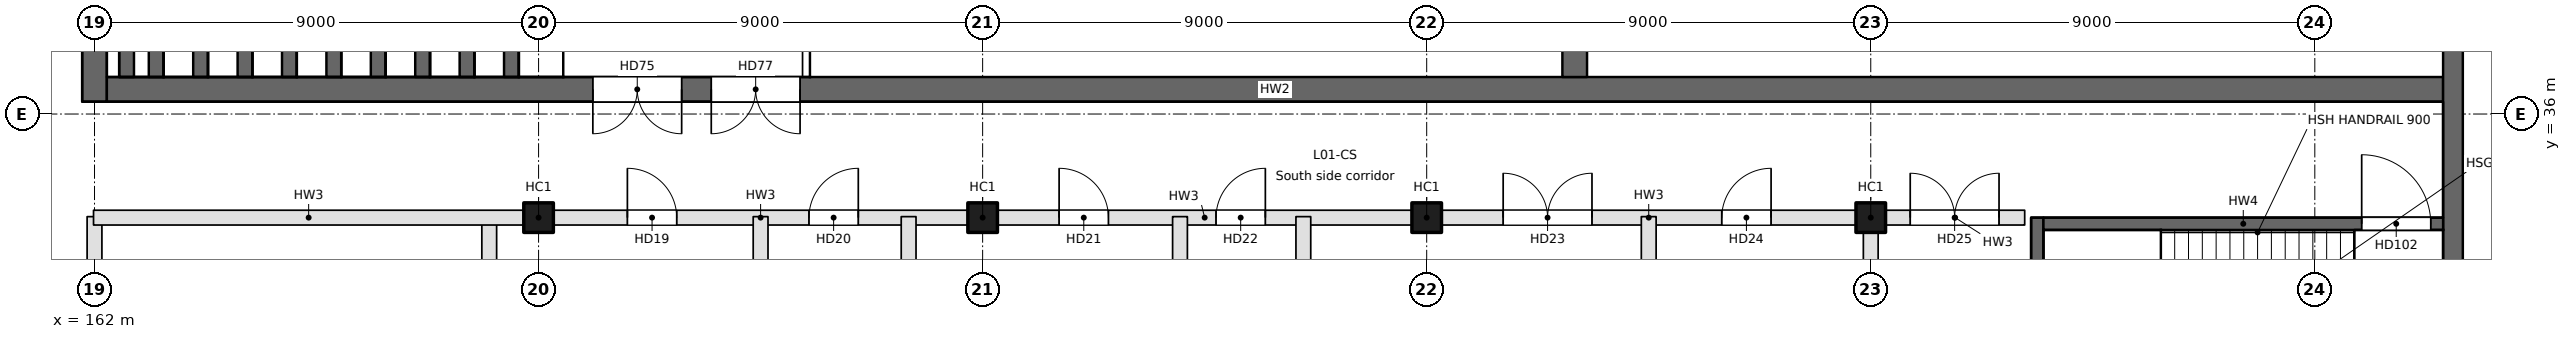
"""IFC4 building model, lengths in metres.
Left out: names, types, materials, properties, quantities, classifications, styles, units other than length and angle.
Written with IfcOpenShell. Run it as: python <this file> out.ifc"""

import sys

from ifc_helpers import new_model, si_unit, direction, frame, frame_2d, origin, origin_2d, place, context, subcontext, project, spatial, rectangle, extrude, element, fill, save


model = new_model("IFC4")
c1 = context("Model", 3, precision=1e-05, world=origin(), true_north=direction((0.0, 1.0)))
c2 = subcontext(c1, "Body", "Model", "MODEL_VIEW")
j1 = project(units=[si_unit("LENGTHUNIT", "METRE"), si_unit("PLANEANGLEUNIT", "RADIAN")], contexts=[c1])
p1 = place(None, origin())
s1 = spatial("IfcSite", under=j1, at=p1, CompositionType="ELEMENT")
p2 = place(p1, origin())
s2 = spatial("IfcBuilding", under=s1, at=p2, CompositionType="ELEMENT")
p3 = place(p2, frame((0.0, 0.0, 6.0)))
s3 = spatial("IfcBuildingStorey", under=s2, at=p3, CompositionType="ELEMENT", Elevation=6.0)
for number, where, z_axis, x_axis in (
    (1, (171.0, 33.9, 0.0), (0.0, 0.0, 1.0), (1.0, 0.0, 0.0)),
    (2, (180.0, 33.9, 0.0), (0.0, 0.0, 1.0), (1.0, 0.0, 0.0)),
    (3, (189.0, 33.9, 0.0), (0.0, 0.0, 1.0), (1.0, 0.0, 0.0)),
    (4, (198.0, 33.9, 0.0), (0.0, 0.0, 1.0), (1.0, 0.0, 0.0)),
):
    element("IfcColumn", number, at=place(p3, frame(where, z_axis=z_axis, x_axis=x_axis)), inside=s3, PredefinedType="COLUMN", context=c2, shape_type="SweptSolid", body=[
        extrude(rectangle(XDim=0.6, YDim=0.6, at=origin_2d()), origin(), (0.0, 0.0, 1.0), 5.4),
    ])
p4 = place(p3, frame((162.0, 36.25, -0.35), z_axis=(0.0, 0.0, 1.0), x_axis=(0.0, 1.0, 0.0)))
e5 = element("IfcWall", 5, at=p4, inside=s3, PredefinedType="SOLIDWALL", context=c2, shape_type="SweptSolid", body=[
    extrude(rectangle(XDim=26.5, YDim=0.5, at=frame_2d((13.25, 0.0))), origin(), (0.0, 0.0, 1.0), 5.4),
])
p5 = place(p3, frame((209.6, 36.5, -0.35), z_axis=(0.0, 0.0, 1.0), x_axis=(-1.0, 0.0, 0.0)))
e6 = element("IfcWall", 6, at=p5, inside=s3, PredefinedType="SOLIDWALL", context=c2, shape_type="SweptSolid", body=[
    extrude(rectangle(XDim=47.35, YDim=0.5, at=frame_2d((23.675, 0.0))), origin(), (0.0, 0.0, 1.0), 5.4),
])
p6 = place(p5, frame((35.7, 0.0, 0.35)))
e7 = element("IfcOpeningElement", 7, at=p6, cuts=e6, PredefinedType="OPENING", context=c2, shape_type="SweptSolid", body=[
    extrude(rectangle(XDim=1.8, YDim=2.4, at=frame_2d((0.9, 1.2))), frame((0.0, 0.25, 0.0), z_axis=(0.0, -1.0, 0.0), x_axis=(1.0, 0.0, 0.0)), (0.0, 0.0, 1.0), 0.5),
])
p7 = place(p5, frame((33.3, 0.0, 0.35)))
e8 = element("IfcOpeningElement", 8, at=p7, cuts=e6, PredefinedType="OPENING", context=c2, shape_type="SweptSolid", body=[
    extrude(rectangle(XDim=1.8, YDim=2.4, at=frame_2d((0.9, 1.2))), frame((0.0, 0.25, 0.0), z_axis=(0.0, -1.0, 0.0), x_axis=(1.0, 0.0, 0.0)), (0.0, 0.0, 1.0), 0.5),
])
p8 = place(p3, frame((192.0, 36.75, -0.35), z_axis=(0.0, 0.0, 1.0), x_axis=(0.0, 1.0, 0.0)))
e9 = element("IfcWall", 9, at=p8, inside=s3, PredefinedType="SOLIDWALL", context=c2, shape_type="SweptSolid", body=[
    extrude(rectangle(XDim=5.75, YDim=0.5, at=frame_2d((2.875, 0.0))), origin(), (0.0, 0.0, 1.0), 5.4),
])
p9 = place(p3, frame((209.8, 76.5, -0.35), z_axis=(0.0, 0.0, 1.0), x_axis=(0.0, -1.0, 0.0)))
e10 = element("IfcWall", 10, at=p9, inside=s3, PredefinedType="SOLIDWALL", context=c2, shape_type="SweptSolid", body=[
    extrude(rectangle(XDim=54.0, YDim=0.4, at=frame_2d((27.0, 0.0))), origin(), (0.0, 0.0, 1.0), 5.4),
])
p10 = place(p9, frame((49.3, 0.0, 1.25)))
e11 = element("IfcOpeningElement", 11, at=p10, cuts=e10, PredefinedType="OPENING", context=c2, shape_type="SweptSolid", body=[
    extrude(rectangle(XDim=2.4, YDim=1.8, at=frame_2d((1.2, 0.9))), frame((0.0, 0.2, 0.0), z_axis=(0.0, -1.0, 0.0), x_axis=(1.0, 0.0, 0.0)), (0.0, 0.0, 1.0), 0.4),
])
p11 = place(p9, frame((2.3, 0.0, 1.25)))
e12 = element("IfcOpeningElement", 12, at=p11, cuts=e10, PredefinedType="OPENING", context=c2, shape_type="SweptSolid", body=[
    extrude(rectangle(XDim=2.4, YDim=1.8, at=frame_2d((1.2, 0.9))), frame((0.0, 0.2, 0.0), z_axis=(0.0, -1.0, 0.0), x_axis=(1.0, 0.0, 0.0)), (0.0, 0.0, 1.0), 0.4),
])
p12 = place(p3, frame((170.45, 36.75, 0.0), z_axis=(0.0, 0.0, 1.0), x_axis=(0.0, 1.0, 0.0)))
e13 = element("IfcWall", 13, at=p12, inside=s3, PredefinedType="SOLIDWALL", context=c2, shape_type="SweptSolid", body=[
    extrude(rectangle(XDim=25.5, YDim=0.3, at=frame_2d((12.75, 0.0))), origin(), (0.0, 0.0, 1.0), 0.2),
])
p13 = place(p3, frame((169.55, 36.75, 0.0), z_axis=(0.0, 0.0, 1.0), x_axis=(0.0, 1.0, 0.0)))
e14 = element("IfcWall", 14, at=p13, inside=s3, PredefinedType="SOLIDWALL", context=c2, shape_type="SweptSolid", body=[
    extrude(rectangle(XDim=25.5, YDim=0.3, at=frame_2d((12.75, 0.0))), origin(), (0.0, 0.0, 1.0), 0.4),
])
p14 = place(p3, frame((168.65, 36.75, 0.0), z_axis=(0.0, 0.0, 1.0), x_axis=(0.0, 1.0, 0.0)))
e15 = element("IfcWall", 15, at=p14, inside=s3, PredefinedType="SOLIDWALL", context=c2, shape_type="SweptSolid", body=[
    extrude(rectangle(XDim=25.5, YDim=0.3, at=frame_2d((12.75, 0.0))), origin(), (0.0, 0.0, 1.0), 0.6),
])
p15 = place(p3, frame((167.75, 36.75, 0.0), z_axis=(0.0, 0.0, 1.0), x_axis=(0.0, 1.0, 0.0)))
e16 = element("IfcWall", 16, at=p15, inside=s3, PredefinedType="SOLIDWALL", context=c2, shape_type="SweptSolid", body=[
    extrude(rectangle(XDim=25.5, YDim=0.3, at=frame_2d((12.75, 0.0))), origin(), (0.0, 0.0, 1.0), 0.8),
])
p16 = place(p3, frame((166.85, 36.75, 0.0), z_axis=(0.0, 0.0, 1.0), x_axis=(0.0, 1.0, 0.0)))
e17 = element("IfcWall", 17, at=p16, inside=s3, PredefinedType="SOLIDWALL", context=c2, shape_type="SweptSolid", body=[
    extrude(rectangle(XDim=25.5, YDim=0.3, at=frame_2d((12.75, 0.0))), origin(), (0.0, 0.0, 1.0), 1.0),
])
p17 = place(p3, frame((165.95, 36.75, 0.0), z_axis=(0.0, 0.0, 1.0), x_axis=(0.0, 1.0, 0.0)))
e18 = element("IfcWall", 18, at=p17, inside=s3, PredefinedType="SOLIDWALL", context=c2, shape_type="SweptSolid", body=[
    extrude(rectangle(XDim=25.5, YDim=0.3, at=frame_2d((12.75, 0.0))), origin(), (0.0, 0.0, 1.0), 1.2),
])
p18 = place(p3, frame((165.05, 36.75, 0.0), z_axis=(0.0, 0.0, 1.0), x_axis=(0.0, 1.0, 0.0)))
e19 = element("IfcWall", 19, at=p18, inside=s3, PredefinedType="SOLIDWALL", context=c2, shape_type="SweptSolid", body=[
    extrude(rectangle(XDim=25.5, YDim=0.3, at=frame_2d((12.75, 0.0))), origin(), (0.0, 0.0, 1.0), 1.4),
])
p19 = place(p3, frame((164.15, 36.75, 0.0), z_axis=(0.0, 0.0, 1.0), x_axis=(0.0, 1.0, 0.0)))
e20 = element("IfcWall", 20, at=p19, inside=s3, PredefinedType="SOLIDWALL", context=c2, shape_type="SweptSolid", body=[
    extrude(rectangle(XDim=25.5, YDim=0.3, at=frame_2d((12.75, 0.0))), origin(), (0.0, 0.0, 1.0), 1.6),
])
for number, where, z_axis, x_axis in (
    (21, (163.25, 36.75, 0.0), (0.0, 0.0, 1.0), (0.0, 1.0, 0.0)),
    (22, (162.65, 36.75, 0.0), (0.0, 0.0, 1.0), (0.0, 1.0, 0.0)),
):
    element("IfcWall", number, at=place(p3, frame(where, z_axis=z_axis, x_axis=x_axis)), inside=s3, PredefinedType="SOLIDWALL", context=c2, shape_type="SweptSolid", body=[
        extrude(rectangle(XDim=25.5, YDim=0.3, at=frame_2d((12.75, 0.0))), origin(), (0.0, 0.0, 1.0), 1.8),
    ])
p20 = place(p3, frame((162.0, 22.73, 0.0), z_axis=(0.0, 0.0, 1.0), x_axis=(0.0, 1.0, 0.0)))
e23 = element("IfcWall", 23, at=p20, inside=s3, PredefinedType="PARTITIONING", context=c2, shape_type="SweptSolid", body=[
    extrude(rectangle(XDim=11.19, YDim=0.3, at=frame_2d((5.595, 0.0))), origin(), (0.0, 0.0, 1.0), 5.05),
])
p21 = place(p20, frame((4.75, 0.0, 0.0)))
e24 = element("IfcOpeningElement", 24, at=p21, cuts=e23, PredefinedType="OPENING", context=c2, shape_type="SweptSolid", body=[
    extrude(rectangle(XDim=1.8, YDim=2.1, at=frame_2d((0.9, 1.05))), frame((0.0, 0.15, 0.0), z_axis=(0.0, -1.0, 0.0), x_axis=(1.0, 0.0, 0.0)), (0.0, 0.0, 1.0), 0.3),
])
p22 = place(p3, frame((170.0, 22.73, 0.0), z_axis=(0.0, 0.0, 1.0), x_axis=(0.0, 1.0, 0.0)))
e25 = element("IfcWall", 25, at=p22, inside=s3, PredefinedType="PARTITIONING", context=c2, shape_type="SweptSolid", body=[
    extrude(rectangle(XDim=11.19, YDim=0.3, at=frame_2d((5.595, 0.0))), origin(), (0.0, 0.0, 1.0), 5.05),
])
p23 = place(p3, frame((161.98, 33.9, 0.0), z_axis=(0.0, 0.0, 1.0), x_axis=(1.0, 0.0, 0.0)))
e26 = element("IfcWall", 26, at=p23, inside=s3, PredefinedType="PARTITIONING", context=c2, shape_type="SweptSolid", body=[
    extrude(rectangle(XDim=8.72, YDim=0.3, at=frame_2d((4.36, 0.0))), origin(), (0.0, 0.0, 1.0), 5.05),
])
p24 = place(p3, frame((171.3, 33.9, 0.0), z_axis=(0.0, 0.0, 1.0), x_axis=(1.0, 0.0, 0.0)))
e27 = element("IfcWall", 27, at=p24, inside=s3, PredefinedType="PARTITIONING", context=c2, shape_type="SweptSolid", body=[
    extrude(rectangle(XDim=8.4, YDim=0.3, at=frame_2d((4.2, 0.0))), origin(), (0.0, 0.0, 1.0), 5.05),
])
p25 = place(p24, frame((1.5, 0.0, 0.0)))
e28 = element("IfcOpeningElement", 28, at=p25, cuts=e27, PredefinedType="OPENING", context=c2, shape_type="SweptSolid", body=[
    extrude(rectangle(XDim=1.0, YDim=2.1, at=frame_2d((0.5, 1.05))), frame((0.0, 0.15, 0.0), z_axis=(0.0, -1.0, 0.0), x_axis=(1.0, 0.0, 0.0)), (0.0, 0.0, 1.0), 0.3),
])
p26 = place(p24, frame((5.18, 0.0, 0.0)))
e29 = element("IfcOpeningElement", 29, at=p26, cuts=e27, PredefinedType="OPENING", context=c2, shape_type="SweptSolid", body=[
    extrude(rectangle(XDim=1.0, YDim=2.1, at=frame_2d((0.5, 1.05))), frame((0.0, 0.15, 0.0), z_axis=(0.0, -1.0, 0.0), x_axis=(1.0, 0.0, 0.0)), (0.0, 0.0, 1.0), 0.3),
])
p27 = place(p3, frame((180.3, 33.9, 0.0), z_axis=(0.0, 0.0, 1.0), x_axis=(1.0, 0.0, 0.0)))
e30 = element("IfcWall", 30, at=p27, inside=s3, PredefinedType="PARTITIONING", context=c2, shape_type="SweptSolid", body=[
    extrude(rectangle(XDim=8.4, YDim=0.3, at=frame_2d((4.2, 0.0))), origin(), (0.0, 0.0, 1.0), 5.05),
])
p28 = place(p27, frame((1.25, 0.0, 0.0)))
e31 = element("IfcOpeningElement", 31, at=p28, cuts=e30, PredefinedType="OPENING", context=c2, shape_type="SweptSolid", body=[
    extrude(rectangle(XDim=1.0, YDim=2.1, at=frame_2d((0.5, 1.05))), frame((0.0, 0.15, 0.0), z_axis=(0.0, -1.0, 0.0), x_axis=(1.0, 0.0, 0.0)), (0.0, 0.0, 1.0), 0.3),
])
p29 = place(p27, frame((4.43, 0.0, 0.0)))
e32 = element("IfcOpeningElement", 32, at=p29, cuts=e30, PredefinedType="OPENING", context=c2, shape_type="SweptSolid", body=[
    extrude(rectangle(XDim=1.0, YDim=2.1, at=frame_2d((0.5, 1.05))), frame((0.0, 0.15, 0.0), z_axis=(0.0, -1.0, 0.0), x_axis=(1.0, 0.0, 0.0)), (0.0, 0.0, 1.0), 0.3),
])
p30 = place(p3, frame((189.3, 33.9, 0.0), z_axis=(0.0, 0.0, 1.0), x_axis=(1.0, 0.0, 0.0)))
e33 = element("IfcWall", 33, at=p30, inside=s3, PredefinedType="PARTITIONING", context=c2, shape_type="SweptSolid", body=[
    extrude(rectangle(XDim=8.4, YDim=0.3, at=frame_2d((4.2, 0.0))), origin(), (0.0, 0.0, 1.0), 5.05),
])
p31 = place(p30, frame((1.25, 0.0, 0.0)))
e34 = element("IfcOpeningElement", 34, at=p31, cuts=e33, PredefinedType="OPENING", context=c2, shape_type="SweptSolid", body=[
    extrude(rectangle(XDim=1.8, YDim=2.1, at=frame_2d((0.9, 1.05))), frame((0.0, 0.15, 0.0), z_axis=(0.0, -1.0, 0.0), x_axis=(1.0, 0.0, 0.0)), (0.0, 0.0, 1.0), 0.3),
])
p32 = place(p30, frame((5.68, 0.0, 0.0)))
e35 = element("IfcOpeningElement", 35, at=p32, cuts=e33, PredefinedType="OPENING", context=c2, shape_type="SweptSolid", body=[
    extrude(rectangle(XDim=1.0, YDim=2.1, at=frame_2d((0.5, 1.05))), frame((0.0, 0.15, 0.0), z_axis=(0.0, -1.0, 0.0), x_axis=(1.0, 0.0, 0.0)), (0.0, 0.0, 1.0), 0.3),
])
p33 = place(p3, frame((198.3, 33.9, 0.0), z_axis=(0.0, 0.0, 1.0), x_axis=(1.0, 0.0, 0.0)))
e36 = element("IfcWall", 36, at=p33, inside=s3, PredefinedType="PARTITIONING", context=c2, shape_type="SweptSolid", body=[
    extrude(rectangle(XDim=2.82, YDim=0.3, at=frame_2d((1.41, 0.0))), origin(), (0.0, 0.0, 1.0), 5.05),
])
p34 = place(p33, frame((0.5, 0.0, 0.0)))
e37 = element("IfcOpeningElement", 37, at=p34, cuts=e36, PredefinedType="OPENING", context=c2, shape_type="SweptSolid", body=[
    extrude(rectangle(XDim=1.8, YDim=2.1, at=frame_2d((0.9, 1.05))), frame((0.0, 0.15, 0.0), z_axis=(0.0, -1.0, 0.0), x_axis=(1.0, 0.0, 0.0)), (0.0, 0.0, 1.0), 0.3),
])
for number, where, z_axis, x_axis in (
    (38, (175.5, 22.73, 0.0), (0.0, 0.0, 1.0), (0.0, 1.0, 0.0)),
    (39, (178.5, 22.73, 0.0), (0.0, 0.0, 1.0), (0.0, 1.0, 0.0)),
    (40, (184.0, 22.73, 0.0), (0.0, 0.0, 1.0), (0.0, 1.0, 0.0)),
    (41, (186.5, 22.73, 0.0), (0.0, 0.0, 1.0), (0.0, 1.0, 0.0)),
    (42, (193.5, 22.73, 0.0), (0.0, 0.0, 1.0), (0.0, 1.0, 0.0)),
):
    element("IfcWall", number, at=place(p3, frame(where, z_axis=z_axis, x_axis=x_axis)), inside=s3, PredefinedType="PARTITIONING", context=c2, shape_type="SweptSolid", body=[
        extrude(rectangle(XDim=11.19, YDim=0.3, at=frame_2d((5.595, 0.0))), origin(), (0.0, 0.0, 1.0), 5.05),
    ])
p35 = place(p3, frame((198.0, 22.73, 0.0), z_axis=(0.0, 0.0, 1.0), x_axis=(0.0, 1.0, 0.0)))
e43 = element("IfcWall", 43, at=p35, inside=s3, PredefinedType="PARTITIONING", context=c2, shape_type="SweptSolid", body=[
    extrude(rectangle(XDim=10.87, YDim=0.3, at=frame_2d((5.435, 0.0))), origin(), (0.0, 0.0, 1.0), 5.05),
])
p36 = place(p3, frame((201.375, 29.65, -0.35), z_axis=(0.0, 0.0, 1.0), x_axis=(0.0, 1.0, 0.0)))
e44 = element("IfcWall", 44, at=p36, inside=s3, PredefinedType="SOLIDWALL", context=c2, shape_type="SweptSolid", body=[
    extrude(rectangle(XDim=4.25, YDim=0.25, at=frame_2d((2.125, 0.0))), origin(), (0.0, 0.0, 1.0), 5.4),
])
p37 = place(p3, frame((201.5, 33.775, -0.35), z_axis=(0.0, 0.0, 1.0), x_axis=(1.0, 0.0, 0.0)))
e45 = element("IfcWall", 45, at=p37, inside=s3, PredefinedType="SOLIDWALL", context=c2, shape_type="SweptSolid", body=[
    extrude(rectangle(XDim=8.1, YDim=0.25, at=frame_2d((4.05, 0.0))), origin(), (0.0, 0.0, 1.0), 5.4),
])
p38 = place(p37, frame((6.45, 0.0, 0.35)))
e46 = element("IfcOpeningElement", 46, at=p38, cuts=e45, PredefinedType="OPENING", context=c2, shape_type="SweptSolid", body=[
    extrude(rectangle(XDim=1.4, YDim=2.1, at=frame_2d((0.7, 1.05))), frame((0.0, 0.125, 0.0), z_axis=(0.0, -1.0, 0.0), x_axis=(1.0, 0.0, 0.0)), (0.0, 0.0, 1.0), 0.25),
])
p39 = place(p25, origin())
e47 = element("IfcDoor", 47, at=p39, inside=s3, OperationType="SINGLE_SWING_LEFT", PredefinedType="DOOR", context=c2, shape_type="SweptSolid", body=[
    extrude(rectangle(XDim=1.0, YDim=2.1, at=frame_2d((0.5, 1.05))), frame((0.0, 0.025, 0.0), z_axis=(0.0, -1.0, 0.0), x_axis=(1.0, 0.0, 0.0)), (0.0, 0.0, 1.0), 0.05),
])
fill(e28, e47)
p40 = place(p26, origin())
e48 = element("IfcDoor", 48, at=p40, inside=s3, OperationType="SINGLE_SWING_RIGHT", PredefinedType="DOOR", context=c2, shape_type="SweptSolid", body=[
    extrude(rectangle(XDim=1.0, YDim=2.1, at=frame_2d((0.5, 1.05))), frame((0.0, 0.025, 0.0), z_axis=(0.0, -1.0, 0.0), x_axis=(1.0, 0.0, 0.0)), (0.0, 0.0, 1.0), 0.05),
])
fill(e29, e48)
p41 = place(p28, origin())
e49 = element("IfcDoor", 49, at=p41, inside=s3, OperationType="SINGLE_SWING_LEFT", PredefinedType="DOOR", context=c2, shape_type="SweptSolid", body=[
    extrude(rectangle(XDim=1.0, YDim=2.1, at=frame_2d((0.5, 1.05))), frame((0.0, 0.025, 0.0), z_axis=(0.0, -1.0, 0.0), x_axis=(1.0, 0.0, 0.0)), (0.0, 0.0, 1.0), 0.05),
])
fill(e31, e49)
p42 = place(p29, origin())
e50 = element("IfcDoor", 50, at=p42, inside=s3, OperationType="SINGLE_SWING_RIGHT", PredefinedType="DOOR", context=c2, shape_type="SweptSolid", body=[
    extrude(rectangle(XDim=1.0, YDim=2.1, at=frame_2d((0.5, 1.05))), frame((0.0, 0.025, 0.0), z_axis=(0.0, -1.0, 0.0), x_axis=(1.0, 0.0, 0.0)), (0.0, 0.0, 1.0), 0.05),
])
fill(e32, e50)
p43 = place(p31, origin())
e51 = element("IfcDoor", 51, at=p43, inside=s3, OperationType="DOUBLE_DOOR_SINGLE_SWING", PredefinedType="DOOR", context=c2, shape_type="SweptSolid", body=[
    extrude(rectangle(XDim=1.8, YDim=2.1, at=frame_2d((0.9, 1.05))), frame((0.0, 0.025, 0.0), z_axis=(0.0, -1.0, 0.0), x_axis=(1.0, 0.0, 0.0)), (0.0, 0.0, 1.0), 0.05),
])
fill(e34, e51)
p44 = place(p32, origin())
e52 = element("IfcDoor", 52, at=p44, inside=s3, OperationType="SINGLE_SWING_RIGHT", PredefinedType="DOOR", context=c2, shape_type="SweptSolid", body=[
    extrude(rectangle(XDim=1.0, YDim=2.1, at=frame_2d((0.5, 1.05))), frame((0.0, 0.025, 0.0), z_axis=(0.0, -1.0, 0.0), x_axis=(1.0, 0.0, 0.0)), (0.0, 0.0, 1.0), 0.05),
])
fill(e35, e52)
p45 = place(p34, origin())
e53 = element("IfcDoor", 53, at=p45, inside=s3, OperationType="DOUBLE_DOOR_SINGLE_SWING", PredefinedType="DOOR", context=c2, shape_type="SweptSolid", body=[
    extrude(rectangle(XDim=1.8, YDim=2.1, at=frame_2d((0.9, 1.05))), frame((0.0, 0.025, 0.0), z_axis=(0.0, -1.0, 0.0), x_axis=(1.0, 0.0, 0.0)), (0.0, 0.0, 1.0), 0.05),
])
fill(e37, e53)
p46 = place(p6, origin())
e54 = element("IfcDoor", 54, at=p46, inside=s3, OperationType="DOUBLE_DOOR_SINGLE_SWING", PredefinedType="DOOR", context=c2, shape_type="SweptSolid", body=[
    extrude(rectangle(XDim=1.8, YDim=2.4, at=frame_2d((0.9, 1.2))), frame((0.0, 0.025, 0.0), z_axis=(0.0, -1.0, 0.0), x_axis=(1.0, 0.0, 0.0)), (0.0, 0.0, 1.0), 0.05),
])
fill(e7, e54)
p47 = place(p7, origin())
e55 = element("IfcDoor", 55, at=p47, inside=s3, OperationType="DOUBLE_DOOR_SINGLE_SWING", PredefinedType="DOOR", context=c2, shape_type="SweptSolid", body=[
    extrude(rectangle(XDim=1.8, YDim=2.4, at=frame_2d((0.9, 1.2))), frame((0.0, 0.025, 0.0), z_axis=(0.0, -1.0, 0.0), x_axis=(1.0, 0.0, 0.0)), (0.0, 0.0, 1.0), 0.05),
])
fill(e8, e55)
p48 = place(p38, origin())
e56 = element("IfcDoor", 56, at=p48, inside=s3, OperationType="SINGLE_SWING_LEFT", PredefinedType="DOOR", context=c2, shape_type="SweptSolid", body=[
    extrude(rectangle(XDim=1.4, YDim=2.1, at=frame_2d((0.7, 1.05))), frame((0.0, 0.025, 0.0), z_axis=(0.0, -1.0, 0.0), x_axis=(1.0, 0.0, 0.0)), (0.0, 0.0, 1.0), 0.05),
])
fill(e46, e56)
save(model, sys.argv[1])
